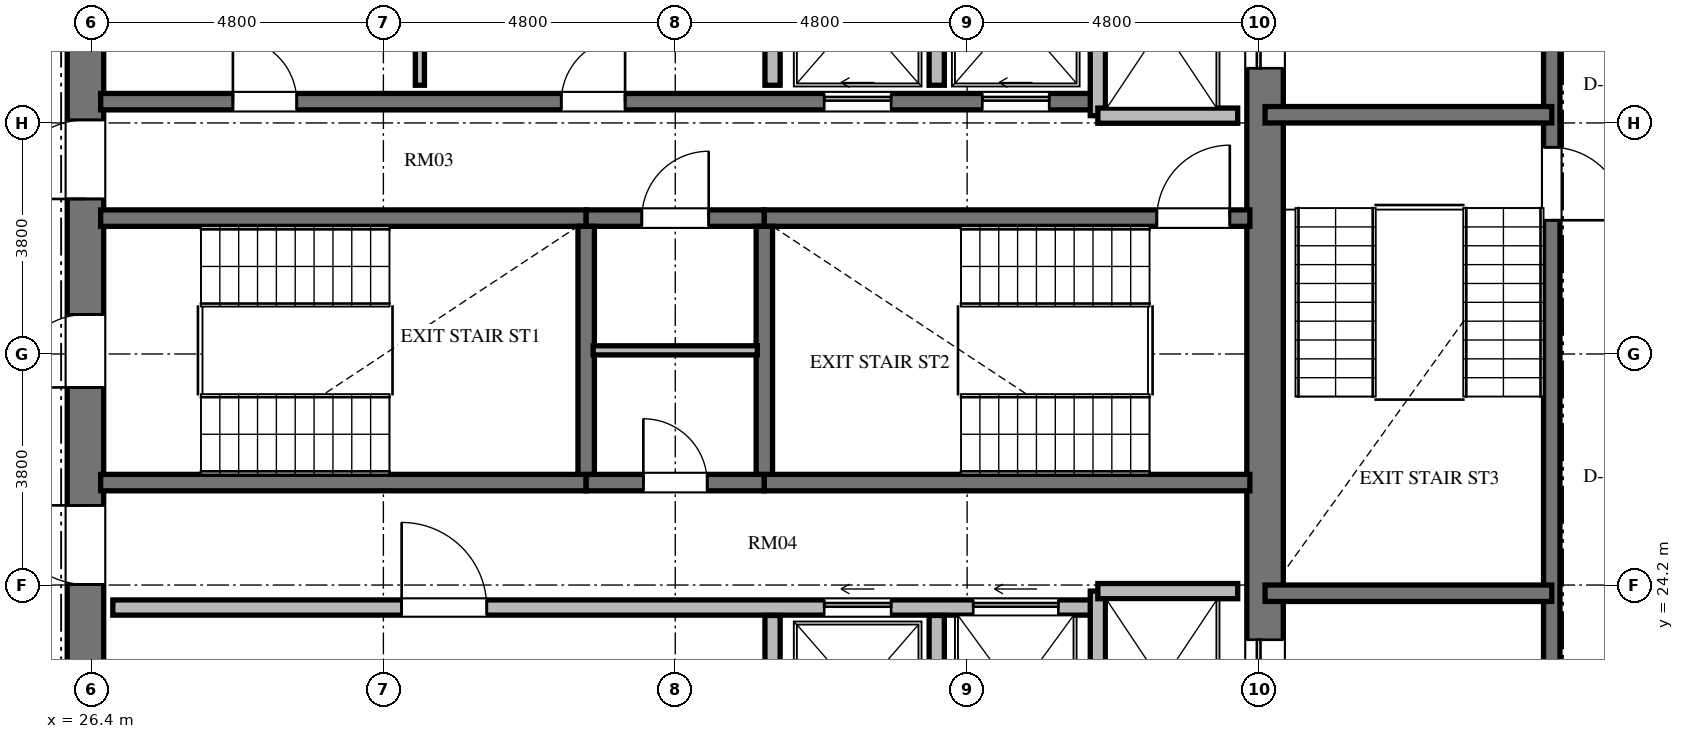
"""IFC4 building model, lengths in metres.
Left out: names, types, materials, properties, quantities, classifications, styles, units other than length and angle.
Written with IfcOpenShell. Run it as: python <this file> out.ifc"""

import sys

from ifc_helpers import new_model, si_unit, direction, frame, frame_2d, origin, place, context, subcontext, project, spatial, rectangle, extrude, element, fill, save


model = new_model("IFC4")
c1 = context("Model", 3, precision=1e-05, world=origin(), true_north=direction((0.0, 1.0)))
c2 = subcontext(c1, "Body", "Model", "MODEL_VIEW")
j1 = project(units=[si_unit("LENGTHUNIT", "METRE"), si_unit("PLANEANGLEUNIT", "RADIAN")], contexts=[c1])
p1 = place(None, origin())
s1 = spatial("IfcSite", under=j1, at=p1, CompositionType="ELEMENT")
p2 = place(p1, origin())
s2 = spatial("IfcBuilding", under=s1, at=p2, CompositionType="ELEMENT")
p3 = place(p2, frame((0.0, 0.0, 205.776)))
s3 = spatial("IfcBuildingStorey", under=s2, at=p3, CompositionType="ELEMENT", Elevation=205.776)
p4 = place(p3, frame((26.3, 20.95, 0.0), z_axis=(0.0, 0.0, 1.0), x_axis=(0.0, 1.0, 0.0)))
e1 = element("IfcWall", 1, at=p4, inside=s3, PredefinedType="SHEAR", context=c2, shape_type="SweptSolid", body=[
    extrude(rectangle(XDim=14.1, YDim=0.6, at=frame_2d((7.05, 0.0))), origin(), (0.0, 0.0, 1.0), 3.648),
])
p5 = place(p4, frame((6.5, 0.0, 0.0)))
e2 = element("IfcOpeningElement", 2, at=p5, cuts=e1, PredefinedType="OPENING", context=c2, shape_type="SweptSolid", body=[
    extrude(rectangle(XDim=1.2, YDim=2.15, at=frame_2d((0.6, 1.075))), frame((0.0, 0.31, 0.0), z_axis=(0.0, -1.0, 0.0), x_axis=(1.0, 0.0, 0.0)), (0.0, 0.0, 1.0), 0.62),
])
p6 = place(p4, frame((9.6, 0.0, 0.0)))
e3 = element("IfcOpeningElement", 3, at=p6, cuts=e1, PredefinedType="OPENING", context=c2, shape_type="SweptSolid", body=[
    extrude(rectangle(XDim=1.3, YDim=2.2, at=frame_2d((0.65, 1.1))), frame((0.0, 0.31, 0.0), z_axis=(0.0, -1.0, 0.0), x_axis=(1.0, 0.0, 0.0)), (0.0, 0.0, 1.0), 0.62),
])
p7 = place(p4, frame((3.26, 0.0, 0.0)))
e4 = element("IfcOpeningElement", 4, at=p7, cuts=e1, PredefinedType="OPENING", context=c2, shape_type="SweptSolid", body=[
    extrude(rectangle(XDim=1.3, YDim=2.2, at=frame_2d((0.65, 1.1))), frame((0.0, 0.31, 0.0), z_axis=(0.0, -1.0, 0.0), x_axis=(1.0, 0.0, 0.0)), (0.0, 0.0, 1.0), 0.62),
])
p8 = place(p3, frame((45.7, 20.95, 0.0), z_axis=(0.0, 0.0, 1.0), x_axis=(0.0, 1.0, 0.0)))
e5 = element("IfcWall", 5, at=p8, inside=s3, PredefinedType="SHEAR", context=c2, shape_type="SweptSolid", body=[
    extrude(rectangle(XDim=14.1, YDim=0.6, at=frame_2d((7.05, 0.0))), origin(), (0.0, 0.0, 1.0), 3.648),
])
p9 = place(p8, frame((11.75, 0.0, 0.0)))
e6 = element("IfcOpeningElement", 6, at=p9, cuts=e5, PredefinedType="OPENING", context=c2, shape_type="SweptSolid", body=[
    extrude(rectangle(XDim=1.4, YDim=2.3, at=frame_2d((0.7, 1.15))), frame((0.0, 0.31, 0.0), z_axis=(0.0, -1.0, 0.0), x_axis=(1.0, 0.0, 0.0)), (0.0, 0.0, 1.0), 0.62),
])
p10 = place(p8, frame((0.95, 0.0, 0.0)))
e7 = element("IfcOpeningElement", 7, at=p10, cuts=e5, PredefinedType="OPENING", context=c2, shape_type="SweptSolid", body=[
    extrude(rectangle(XDim=1.4, YDim=2.3, at=frame_2d((0.7, 1.15))), frame((0.0, 0.31, 0.0), z_axis=(0.0, -1.0, 0.0), x_axis=(1.0, 0.0, 0.0)), (0.0, 0.0, 1.0), 0.62),
])
p11 = place(p3, frame((26.55, 30.235, 0.0), z_axis=(0.0, 0.0, 1.0), x_axis=(1.0, 0.0, 0.0)))
e8 = element("IfcWall", 8, at=p11, inside=s3, PredefinedType="SHEAR", context=c2, shape_type="SweptSolid", body=[
    extrude(rectangle(XDim=7.985, YDim=0.27, at=frame_2d((3.992, 0.0))), origin(), (0.0, 0.0, 1.0), 3.648),
])
p12 = place(p3, frame((34.535, 30.235, 0.0), z_axis=(0.0, 0.0, 1.0), x_axis=(1.0, 0.0, 0.0)))
e9 = element("IfcWall", 9, at=p12, inside=s3, PredefinedType="SHEAR", context=c2, shape_type="SweptSolid", body=[
    extrude(rectangle(XDim=2.93, YDim=0.27, at=frame_2d((1.465, 0.0))), origin(), (0.0, 0.0, 1.0), 3.648),
])
p13 = place(p12, frame((0.915, 0.0, 0.0)))
e10 = element("IfcOpeningElement", 10, at=p13, cuts=e9, PredefinedType="OPENING", context=c2, shape_type="SweptSolid", body=[
    extrude(rectangle(XDim=1.1, YDim=2.15, at=frame_2d((0.55, 1.075))), frame((0.0, 0.145, 0.0), z_axis=(0.0, -1.0, 0.0), x_axis=(1.0, 0.0, 0.0)), (0.0, 0.0, 1.0), 0.29),
])
p14 = place(p3, frame((37.465, 30.235, 0.0), z_axis=(0.0, 0.0, 1.0), x_axis=(1.0, 0.0, 0.0)))
e11 = element("IfcWall", 11, at=p14, inside=s3, PredefinedType="SHEAR", context=c2, shape_type="SweptSolid", body=[
    extrude(rectangle(XDim=7.985, YDim=0.27, at=frame_2d((3.992, 0.0))), origin(), (0.0, 0.0, 1.0), 3.648),
])
p15 = place(p14, frame((6.455, 0.0, 0.0)))
e12 = element("IfcOpeningElement", 12, at=p15, cuts=e11, PredefinedType="OPENING", context=c2, shape_type="SweptSolid", body=[
    extrude(rectangle(XDim=1.2, YDim=2.15, at=frame_2d((0.6, 1.075))), frame((0.0, 0.145, 0.0), z_axis=(0.0, -1.0, 0.0), x_axis=(1.0, 0.0, 0.0)), (0.0, 0.0, 1.0), 0.29),
])
p16 = place(p3, frame((26.55, 25.885, 0.0), z_axis=(0.0, 0.0, 1.0), x_axis=(1.0, 0.0, 0.0)))
e13 = element("IfcWall", 13, at=p16, inside=s3, PredefinedType="SHEAR", context=c2, shape_type="SweptSolid", body=[
    extrude(rectangle(XDim=7.985, YDim=0.27, at=frame_2d((3.992, 0.0))), origin(), (0.0, 0.0, 1.0), 3.648),
])
p17 = place(p3, frame((34.535, 25.885, 0.0), z_axis=(0.0, 0.0, 1.0), x_axis=(1.0, 0.0, 0.0)))
e14 = element("IfcWall", 14, at=p17, inside=s3, PredefinedType="SHEAR", context=c2, shape_type="SweptSolid", body=[
    extrude(rectangle(XDim=2.93, YDim=0.27, at=frame_2d((1.465, 0.0))), origin(), (0.0, 0.0, 1.0), 3.648),
])
p18 = place(p17, frame((0.94, 0.0, 0.0)))
e15 = element("IfcOpeningElement", 15, at=p18, cuts=e14, PredefinedType="OPENING", context=c2, shape_type="SweptSolid", body=[
    extrude(rectangle(XDim=1.05, YDim=2.15, at=frame_2d((0.525, 1.075))), frame((0.0, 0.145, 0.0), z_axis=(0.0, -1.0, 0.0), x_axis=(1.0, 0.0, 0.0)), (0.0, 0.0, 1.0), 0.29),
])
p19 = place(p3, frame((37.465, 25.885, 0.0), z_axis=(0.0, 0.0, 1.0), x_axis=(1.0, 0.0, 0.0)))
e16 = element("IfcWall", 16, at=p19, inside=s3, PredefinedType="SHEAR", context=c2, shape_type="SweptSolid", body=[
    extrude(rectangle(XDim=7.985, YDim=0.27, at=frame_2d((3.992, 0.0))), origin(), (0.0, 0.0, 1.0), 3.648),
])
for number, where, z_axis, x_axis in (
    (17, (34.535, 26.02, 0.0), (0.0, 0.0, 1.0), (0.0, 1.0, 0.0)),
    (18, (37.465, 26.02, 0.0), (0.0, 0.0, 1.0), (0.0, 1.0, 0.0)),
):
    element("IfcWall", number, at=place(p3, frame(where, z_axis=z_axis, x_axis=x_axis)), inside=s3, PredefinedType="SHEAR", context=c2, shape_type="SweptSolid", body=[
        extrude(rectangle(XDim=4.08, YDim=0.27, at=frame_2d((2.04, 0.0))), origin(), (0.0, 0.0, 1.0), 3.648),
    ])
p20 = place(p3, frame((34.65, 28.06, 0.0), z_axis=(0.0, 0.0, 1.0), x_axis=(1.0, 0.0, 0.0)))
e19 = element("IfcWall", 19, at=p20, inside=s3, PredefinedType="PARTITIONING", context=c2, shape_type="SweptSolid", body=[
    extrude(rectangle(XDim=2.7, YDim=0.15, at=frame_2d((1.35, 0.0))), origin(), (0.0, 0.0, 1.0), 3.448),
])
p21 = place(p3, frame((26.55, 32.15, 0.0), z_axis=(0.0, 0.0, 1.0), x_axis=(1.0, 0.0, 0.0)))
e20 = element("IfcWall", 20, at=p21, inside=s3, PredefinedType="SHEAR", context=c2, shape_type="SweptSolid", body=[
    extrude(rectangle(XDim=16.4, YDim=0.27, at=frame_2d((8.2, 0.0))), origin(), (0.0, 0.0, 1.0), 3.648),
])
p22 = place(p21, frame((2.175, 0.0, 0.0)))
e21 = element("IfcOpeningElement", 21, at=p22, cuts=e20, PredefinedType="OPENING", context=c2, shape_type="SweptSolid", body=[
    extrude(rectangle(XDim=1.05, YDim=2.15, at=frame_2d((0.525, 1.075))), frame((0.0, 0.145, 0.0), z_axis=(0.0, -1.0, 0.0), x_axis=(1.0, 0.0, 0.0)), (0.0, 0.0, 1.0), 0.29),
])
p23 = place(p21, frame((7.575, 0.0, 0.0)))
e22 = element("IfcOpeningElement", 22, at=p23, cuts=e20, PredefinedType="OPENING", context=c2, shape_type="SweptSolid", body=[
    extrude(rectangle(XDim=1.05, YDim=2.15, at=frame_2d((0.525, 1.075))), frame((0.0, 0.145, 0.0), z_axis=(0.0, -1.0, 0.0), x_axis=(1.0, 0.0, 0.0)), (0.0, 0.0, 1.0), 0.29),
])
p24 = place(p21, frame((11.9, 0.0, 0.0)))
e23 = element("IfcOpeningElement", 23, at=p24, cuts=e20, PredefinedType="OPENING", context=c2, shape_type="SweptSolid", body=[
    extrude(rectangle(XDim=1.1, YDim=2.2, at=frame_2d((0.55, 1.1))), frame((0.0, 0.145, 0.0), z_axis=(0.0, -1.0, 0.0), x_axis=(1.0, 0.0, 0.0)), (0.0, 0.0, 1.0), 0.29),
])
p25 = place(p21, frame((14.5, 0.0, 0.0)))
e24 = element("IfcOpeningElement", 24, at=p25, cuts=e20, PredefinedType="OPENING", context=c2, shape_type="SweptSolid", body=[
    extrude(rectangle(XDim=1.1, YDim=2.2, at=frame_2d((0.55, 1.1))), frame((0.0, 0.145, 0.0), z_axis=(0.0, -1.0, 0.0), x_axis=(1.0, 0.0, 0.0)), (0.0, 0.0, 1.0), 0.29),
])
p26 = place(p3, frame((26.75, 23.83, 0.0), z_axis=(0.0, 0.0, 1.0), x_axis=(1.0, 0.0, 0.0)))
e25 = element("IfcWall", 25, at=p26, inside=s3, PredefinedType="SOLIDWALL", context=c2, shape_type="SweptSolid", body=[
    extrude(rectangle(XDim=16.2, YDim=0.25, at=frame_2d((8.1, 0.0))), origin(), (0.0, 0.0, 1.0), 3.448),
])
p27 = place(p26, frame((4.75, 0.0, 0.0)))
e26 = element("IfcOpeningElement", 26, at=p27, cuts=e25, PredefinedType="OPENING", context=c2, shape_type="SweptSolid", body=[
    extrude(rectangle(XDim=1.4, YDim=2.2, at=frame_2d((0.7, 1.1))), frame((0.0, 0.135, 0.0), z_axis=(0.0, -1.0, 0.0), x_axis=(1.0, 0.0, 0.0)), (0.0, 0.0, 1.0), 0.27),
])
p28 = place(p26, frame((11.7, 0.0, 0.0)))
e27 = element("IfcOpeningElement", 27, at=p28, cuts=e25, PredefinedType="OPENING", context=c2, shape_type="SweptSolid", body=[
    extrude(rectangle(XDim=1.1, YDim=2.2, at=frame_2d((0.55, 1.1))), frame((0.0, 0.135, 0.0), z_axis=(0.0, -1.0, 0.0), x_axis=(1.0, 0.0, 0.0)), (0.0, 0.0, 1.0), 0.27),
])
p29 = place(p26, frame((14.15, 0.0, 0.0)))
e28 = element("IfcOpeningElement", 28, at=p29, cuts=e25, PredefinedType="OPENING", context=c2, shape_type="SweptSolid", body=[
    extrude(rectangle(XDim=1.4, YDim=2.3, at=frame_2d((0.7, 1.15))), frame((0.0, 0.135, 0.0), z_axis=(0.0, -1.0, 0.0), x_axis=(1.0, 0.0, 0.0)), (0.0, 0.0, 1.0), 0.27),
])
p30 = place(p3, frame((42.95, 31.92, 0.0), z_axis=(0.0, 0.0, 1.0), x_axis=(0.0, 1.0, 0.0)))
e29 = element("IfcWall", 29, at=p30, inside=s3, PredefinedType="SOLIDWALL", context=c2, shape_type="SweptSolid", body=[
    extrude(rectangle(XDim=3.18, YDim=0.25, at=frame_2d((1.59, 0.0))), origin(), (0.0, 0.0, 1.0), 3.448),
])
p31 = place(p3, frame((42.95, 31.92, 0.0), z_axis=(0.0, 0.0, 1.0), x_axis=(1.0, 0.0, 0.0)))
e30 = element("IfcWall", 30, at=p31, inside=s3, PredefinedType="SOLIDWALL", context=c2, shape_type="SweptSolid", body=[
    extrude(rectangle(XDim=2.3, YDim=0.25, at=frame_2d((1.15, 0.0))), origin(), (0.0, 0.0, 1.0), 3.448),
])
p32 = place(p3, frame((42.95, 20.9, 0.0), z_axis=(0.0, 0.0, 1.0), x_axis=(0.0, 1.0, 0.0)))
e31 = element("IfcWall", 31, at=p32, inside=s3, PredefinedType="SOLIDWALL", context=c2, shape_type="SweptSolid", body=[
    extrude(rectangle(XDim=3.2, YDim=0.25, at=frame_2d((1.6, 0.0))), origin(), (0.0, 0.0, 1.0), 3.448),
])
p33 = place(p3, frame((42.95, 24.1, 0.0), z_axis=(0.0, 0.0, 1.0), x_axis=(1.0, 0.0, 0.0)))
e32 = element("IfcWall", 32, at=p33, inside=s3, PredefinedType="SOLIDWALL", context=c2, shape_type="SweptSolid", body=[
    extrude(rectangle(XDim=2.3, YDim=0.25, at=frame_2d((1.15, 0.0))), origin(), (0.0, 0.0, 1.0), 3.448),
])
p34 = place(p3, frame((37.6, 32.42, 0.0), z_axis=(0.0, 0.0, 1.0), x_axis=(0.0, 1.0, 0.0)))
e33 = element("IfcWall", 33, at=p34, inside=s3, PredefinedType="SOLIDWALL", context=c2, shape_type="SweptSolid", body=[
    extrude(rectangle(XDim=2.68, YDim=0.25, at=frame_2d((1.34, 0.0))), origin(), (0.0, 0.0, 1.0), 3.448),
])
p35 = place(p3, frame((37.6, 20.9, 0.0), z_axis=(0.0, 0.0, 1.0), x_axis=(0.0, 1.0, 0.0)))
e34 = element("IfcWall", 34, at=p35, inside=s3, PredefinedType="SOLIDWALL", context=c2, shape_type="SweptSolid", body=[
    extrude(rectangle(XDim=2.8, YDim=0.25, at=frame_2d((1.4, 0.0))), origin(), (0.0, 0.0, 1.0), 3.448),
])
p36 = place(p3, frame((40.3, 32.42, 0.0), z_axis=(0.0, 0.0, 1.0), x_axis=(0.0, 1.0, 0.0)))
e35 = element("IfcWall", 35, at=p36, inside=s3, PredefinedType="SOLIDWALL", context=c2, shape_type="SweptSolid", body=[
    extrude(rectangle(XDim=2.68, YDim=0.25, at=frame_2d((1.34, 0.0))), origin(), (0.0, 0.0, 1.0), 3.448),
])
p37 = place(p3, frame((40.3, 20.9, 0.0), z_axis=(0.0, 0.0, 1.0), x_axis=(0.0, 1.0, 0.0)))
e36 = element("IfcWall", 36, at=p37, inside=s3, PredefinedType="SOLIDWALL", context=c2, shape_type="SweptSolid", body=[
    extrude(rectangle(XDim=2.8, YDim=0.25, at=frame_2d((1.4, 0.0))), origin(), (0.0, 0.0, 1.0), 3.448),
])
p38 = place(p3, frame((31.8, 32.42, 0.0), z_axis=(0.0, 0.0, 1.0), x_axis=(0.0, 1.0, 0.0)))
e37 = element("IfcWall", 37, at=p38, inside=s3, PredefinedType="PARTITIONING", context=c2, shape_type="SweptSolid", body=[
    extrude(rectangle(XDim=2.68, YDim=0.15, at=frame_2d((1.34, 0.0))), origin(), (0.0, 0.0, 1.0), 3.448),
])
p39 = place(p3, frame((50.415, 35.845, 0.0), z_axis=(0.0, 0.0, 1.0), x_axis=(0.0, -1.0, 0.0)))
e38 = element("IfcWall", 38, at=p39, inside=s3, PredefinedType="SHEAR", context=c2, shape_type="SweptSolid", body=[
    extrude(rectangle(XDim=15.825, YDim=0.27, at=frame_2d((7.913, 0.0))), origin(), (0.0, 0.0, 1.0), 3.648),
])
p40 = place(p39, frame((4.445, 0.0, 0.0)))
e39 = element("IfcOpeningElement", 39, at=p40, cuts=e38, PredefinedType="OPENING", context=c2, shape_type="SweptSolid", body=[
    extrude(rectangle(XDim=1.2, YDim=2.15, at=frame_2d((0.6, 1.075))), frame((0.0, 0.145, 0.0), z_axis=(0.0, -1.0, 0.0), x_axis=(1.0, 0.0, 0.0)), (0.0, 0.0, 1.0), 0.29),
])
p41 = place(p39, frame((1.295, 0.0, 0.0)))
e40 = element("IfcOpeningElement", 40, at=p41, cuts=e38, PredefinedType="OPENING", context=c2, shape_type="SweptSolid", body=[
    extrude(rectangle(XDim=1.3, YDim=2.2, at=frame_2d((0.65, 1.1))), frame((0.0, 0.145, 0.0), z_axis=(0.0, -1.0, 0.0), x_axis=(1.0, 0.0, 0.0)), (0.0, 0.0, 1.0), 0.29),
])
p42 = place(p39, frame((13.095, 0.0, 0.0)))
e41 = element("IfcOpeningElement", 41, at=p42, cuts=e38, PredefinedType="OPENING", context=c2, shape_type="SweptSolid", body=[
    extrude(rectangle(XDim=1.3, YDim=2.2, at=frame_2d((0.65, 1.1))), frame((0.0, 0.145, 0.0), z_axis=(0.0, -1.0, 0.0), x_axis=(1.0, 0.0, 0.0)), (0.0, 0.0, 1.0), 0.29),
])
for number, where, z_axis, x_axis in (
    (42, (45.7, 31.935, 0.0), (0.0, 0.0, 1.0), (1.0, 0.0, 0.0)),
    (43, (45.7, 24.065, 0.0), (0.0, 0.0, 1.0), (1.0, 0.0, 0.0)),
):
    element("IfcWall", number, at=place(p3, frame(where, z_axis=z_axis, x_axis=x_axis)), inside=s3, PredefinedType="SHEAR", context=c2, shape_type="SweptSolid", body=[
        extrude(rectangle(XDim=4.715, YDim=0.27, at=frame_2d((2.357, 0.0))), origin(), (0.0, 0.0, 1.0), 3.648),
    ])
p43 = place(p3, frame((53.078, 23.714, 0.0), z_axis=(0.0, 0.0, 1.0), x_axis=(-0.691353379446, -0.722516785085, 0.0)))
e44 = element("IfcWall", 44, at=p43, inside=s3, PredefinedType="PARTITIONING", context=c2, shape_type="SweptSolid", body=[
    extrude(rectangle(XDim=3.604, YDim=0.18, at=frame_2d((1.802, 0.0))), origin(), (0.0, 0.0, 1.0), 3.448),
])
p44 = place(p5, origin())
e45 = element("IfcDoor", 45, at=p44, inside=s3, OperationType="SINGLE_SWING_LEFT", PredefinedType="DOOR", context=c2, shape_type="SweptSolid", body=[
    extrude(rectangle(XDim=1.2, YDim=2.15, at=frame_2d((0.6, 1.075))), frame((0.0, 0.025, 0.0), z_axis=(0.0, -1.0, 0.0), x_axis=(1.0, 0.0, 0.0)), (0.0, 0.0, 1.0), 0.05),
])
fill(e2, e45)
p45 = place(p15, origin())
e46 = element("IfcDoor", 46, at=p45, inside=s3, OperationType="SINGLE_SWING_RIGHT", PredefinedType="DOOR", context=c2, shape_type="SweptSolid", body=[
    extrude(rectangle(XDim=1.2, YDim=2.15, at=frame_2d((0.6, 1.075))), frame((0.0, 0.025, 0.0), z_axis=(0.0, -1.0, 0.0), x_axis=(1.0, 0.0, 0.0)), (0.0, 0.0, 1.0), 0.05),
])
fill(e12, e46)
p46 = place(p18, origin())
e47 = element("IfcDoor", 47, at=p46, inside=s3, OperationType="SINGLE_SWING_LEFT", PredefinedType="DOOR", context=c2, shape_type="SweptSolid", body=[
    extrude(rectangle(XDim=1.05, YDim=2.15, at=frame_2d((0.525, 1.075))), frame((0.0, 0.025, 0.0), z_axis=(0.0, -1.0, 0.0), x_axis=(1.0, 0.0, 0.0)), (0.0, 0.0, 1.0), 0.05),
])
fill(e15, e47)
p47 = place(p13, origin())
e48 = element("IfcDoor", 48, at=p47, inside=s3, OperationType="SINGLE_SWING_RIGHT", PredefinedType="DOOR", context=c2, shape_type="SweptSolid", body=[
    extrude(rectangle(XDim=1.1, YDim=2.15, at=frame_2d((0.55, 1.075))), frame((0.0, 0.025, 0.0), z_axis=(0.0, -1.0, 0.0), x_axis=(1.0, 0.0, 0.0)), (0.0, 0.0, 1.0), 0.05),
])
fill(e10, e48)
p48 = place(p6, origin())
e49 = element("IfcDoor", 49, at=p48, inside=s3, OperationType="SINGLE_SWING_LEFT", PredefinedType="DOOR", context=c2, shape_type="SweptSolid", body=[
    extrude(rectangle(XDim=1.3, YDim=2.2, at=frame_2d((0.65, 1.1))), frame((0.0, 0.025, 0.0), z_axis=(0.0, -1.0, 0.0), x_axis=(1.0, 0.0, 0.0)), (0.0, 0.0, 1.0), 0.05),
])
fill(e3, e49)
p49 = place(p7, origin())
e50 = element("IfcDoor", 50, at=p49, inside=s3, OperationType="SINGLE_SWING_RIGHT", PredefinedType="DOOR", context=c2, shape_type="SweptSolid", body=[
    extrude(rectangle(XDim=1.3, YDim=2.2, at=frame_2d((0.65, 1.1))), frame((0.0, 0.025, 0.0), z_axis=(0.0, -1.0, 0.0), x_axis=(1.0, 0.0, 0.0)), (0.0, 0.0, 1.0), 0.05),
])
fill(e4, e50)
p50 = place(p22, origin())
e51 = element("IfcDoor", 51, at=p50, inside=s3, OperationType="SINGLE_SWING_LEFT", PredefinedType="DOOR", context=c2, shape_type="SweptSolid", body=[
    extrude(rectangle(XDim=1.05, YDim=2.15, at=frame_2d((0.525, 1.075))), frame((0.0, 0.025, 0.0), z_axis=(0.0, -1.0, 0.0), x_axis=(1.0, 0.0, 0.0)), (0.0, 0.0, 1.0), 0.05),
])
fill(e21, e51)
p51 = place(p23, origin())
e52 = element("IfcDoor", 52, at=p51, inside=s3, OperationType="SINGLE_SWING_RIGHT", PredefinedType="DOOR", context=c2, shape_type="SweptSolid", body=[
    extrude(rectangle(XDim=1.05, YDim=2.15, at=frame_2d((0.525, 1.075))), frame((0.0, 0.025, 0.0), z_axis=(0.0, -1.0, 0.0), x_axis=(1.0, 0.0, 0.0)), (0.0, 0.0, 1.0), 0.05),
])
fill(e22, e52)
p52 = place(p27, origin())
e53 = element("IfcDoor", 53, at=p52, inside=s3, OperationType="SINGLE_SWING_LEFT", PredefinedType="DOOR", context=c2, shape_type="SweptSolid", body=[
    extrude(rectangle(XDim=1.4, YDim=2.2, at=frame_2d((0.7, 1.1))), frame((0.0, 0.025, 0.0), z_axis=(0.0, -1.0, 0.0), x_axis=(1.0, 0.0, 0.0)), (0.0, 0.0, 1.0), 0.05),
])
fill(e26, e53)
p53 = place(p24, origin())
e54 = element("IfcDoor", 54, at=p53, inside=s3, OperationType="SLIDING_TO_LEFT", PredefinedType="DOOR", context=c2, shape_type="SweptSolid", body=[
    extrude(rectangle(XDim=1.1, YDim=2.2, at=frame_2d((0.55, 1.1))), frame((0.0, 0.025, 0.0), z_axis=(0.0, -1.0, 0.0), x_axis=(1.0, 0.0, 0.0)), (0.0, 0.0, 1.0), 0.05),
])
fill(e23, e54)
p54 = place(p25, origin())
e55 = element("IfcDoor", 55, at=p54, inside=s3, OperationType="SLIDING_TO_LEFT", PredefinedType="DOOR", context=c2, shape_type="SweptSolid", body=[
    extrude(rectangle(XDim=1.1, YDim=2.2, at=frame_2d((0.55, 1.1))), frame((0.0, 0.025, 0.0), z_axis=(0.0, -1.0, 0.0), x_axis=(1.0, 0.0, 0.0)), (0.0, 0.0, 1.0), 0.05),
])
fill(e24, e55)
p55 = place(p28, origin())
e56 = element("IfcDoor", 56, at=p55, inside=s3, OperationType="SLIDING_TO_LEFT", PredefinedType="DOOR", context=c2, shape_type="SweptSolid", body=[
    extrude(rectangle(XDim=1.1, YDim=2.2, at=frame_2d((0.55, 1.1))), frame((0.0, 0.025, 0.0), z_axis=(0.0, -1.0, 0.0), x_axis=(1.0, 0.0, 0.0)), (0.0, 0.0, 1.0), 0.05),
])
fill(e27, e56)
p56 = place(p9, origin())
e57 = element("IfcDoor", 57, at=p56, inside=s3, OperationType="SLIDING_TO_LEFT", PredefinedType="DOOR", context=c2, shape_type="SweptSolid", body=[
    extrude(rectangle(XDim=1.4, YDim=2.3, at=frame_2d((0.7, 1.15))), frame((0.0, 0.025, 0.0), z_axis=(0.0, -1.0, 0.0), x_axis=(1.0, 0.0, 0.0)), (0.0, 0.0, 1.0), 0.05),
])
fill(e6, e57)
p57 = place(p10, origin())
e58 = element("IfcDoor", 58, at=p57, inside=s3, OperationType="SLIDING_TO_LEFT", PredefinedType="DOOR", context=c2, shape_type="SweptSolid", body=[
    extrude(rectangle(XDim=1.4, YDim=2.3, at=frame_2d((0.7, 1.15))), frame((0.0, 0.025, 0.0), z_axis=(0.0, -1.0, 0.0), x_axis=(1.0, 0.0, 0.0)), (0.0, 0.0, 1.0), 0.05),
])
fill(e7, e58)
p58 = place(p29, origin())
e59 = element("IfcDoor", 59, at=p58, inside=s3, OperationType="SLIDING_TO_LEFT", PredefinedType="DOOR", context=c2, shape_type="SweptSolid", body=[
    extrude(rectangle(XDim=1.4, YDim=2.3, at=frame_2d((0.7, 1.15))), frame((0.0, 0.025, 0.0), z_axis=(0.0, -1.0, 0.0), x_axis=(1.0, 0.0, 0.0)), (0.0, 0.0, 1.0), 0.05),
])
fill(e28, e59)
p59 = place(p40, origin())
e60 = element("IfcDoor", 60, at=p59, inside=s3, OperationType="SINGLE_SWING_RIGHT", PredefinedType="DOOR", context=c2, shape_type="SweptSolid", body=[
    extrude(rectangle(XDim=1.2, YDim=2.15, at=frame_2d((0.6, 1.075))), frame((0.0, 0.025, 0.0), z_axis=(0.0, -1.0, 0.0), x_axis=(1.0, 0.0, 0.0)), (0.0, 0.0, 1.0), 0.05),
])
fill(e39, e60)
save(model, sys.argv[1])
